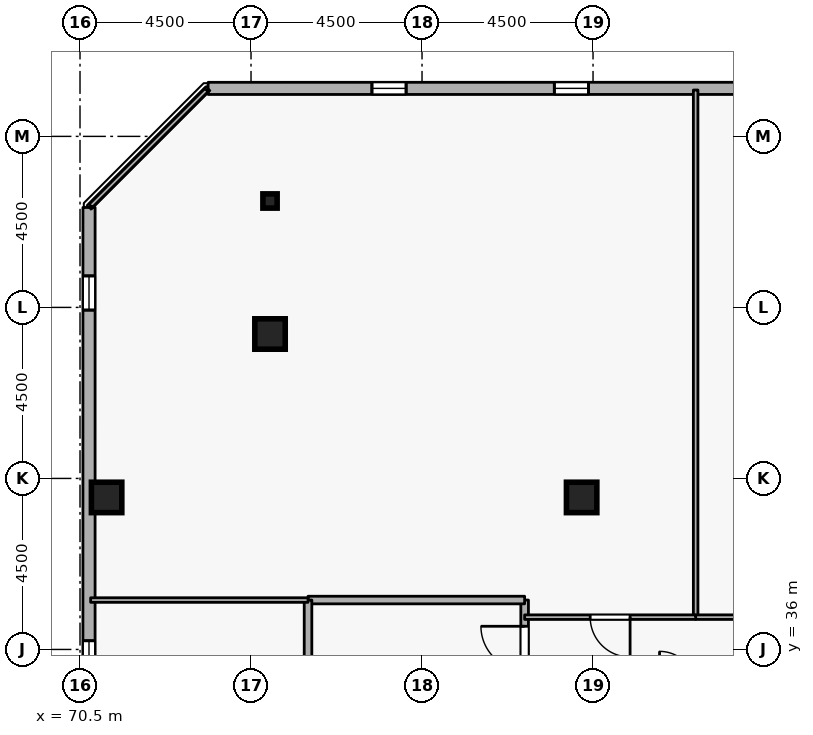
"""IFC4 building model, lengths in metres.
Left out: names, types, materials, properties, quantities, classifications, styles, units other than length and angle.
Written with IfcOpenShell. Run it as: python <this file> out.ifc"""

import sys

from ifc_helpers import new_model, si_unit, direction, frame, frame_2d, origin, origin_2d, place, context, subcontext, project, spatial, rectangle, i_section, extrude, element, fill, save


model = new_model("IFC4")
c1 = context("Model", 3, precision=1e-05, world=origin(), true_north=direction((0.0, 1.0)))
c2 = subcontext(c1, "Body", "Model", "MODEL_VIEW")
j1 = project(units=[si_unit("LENGTHUNIT", "METRE"), si_unit("PLANEANGLEUNIT", "RADIAN")], contexts=[c1])
p1 = place(None, origin())
s1 = spatial("IfcSite", under=j1, at=p1, CompositionType="ELEMENT")
p2 = place(p1, origin())
s2 = spatial("IfcBuilding", under=s1, at=p2, CompositionType="ELEMENT")
p3 = place(p2, frame((0.0, 0.0, 269.1)))
s3 = spatial("IfcBuildingStorey", under=s2, at=p3, CompositionType="ELEMENT", Elevation=269.1)
for number, where, z_axis, x_axis in (
    (1, (75.5, 44.3, 0.0), (0.0, 0.0, 1.0), (1.0, 0.0, 0.0)),
    (2, (71.2, 40.0, 0.0), (0.0, 0.0, 1.0), (1.0, 0.0, 0.0)),
    (3, (83.7, 40.0, 0.0), (0.0, 0.0, 1.0), (1.0, 0.0, 0.0)),
):
    element("IfcColumn", number, at=place(p3, frame(where, z_axis=z_axis, x_axis=x_axis)), inside=s3, PredefinedType="COLUMN", context=c2, shape_type="SweptSolid", body=[
        extrude(rectangle(XDim=0.8, YDim=0.8, at=origin_2d()), origin(), (0.0, 0.0, 1.0), 3.6),
    ])
p4 = place(p3, frame((75.5, 47.8, 0.0), z_axis=(0.0, 0.0, 1.0), x_axis=(1.0, 0.0, 0.0)))
e4 = element("IfcColumn", 4, at=p4, inside=s3, PredefinedType="COLUMN", context=c2, shape_type="SweptSolid", body=[
    extrude(i_section(OverallWidth=0.375, OverallDepth=0.375, WebThickness=0.017, FlangeThickness=0.027, FilletRadius=0.015, at=origin_2d()), origin(), (0.0, 0.0, 1.0), 3.6),
])
p5 = place(p3, frame((109.681, 50.765, 0.0), z_axis=(0.0, 0.0, 1.0), x_axis=(-0.999999998513, -5.4540124e-05, 0.0)))
e5 = element("IfcWall", 5, at=p5, inside=s3, PredefinedType="STANDARD", context=c2, shape_type="SweptSolid", body=[
    extrude(rectangle(XDim=35.811, YDim=0.32, at=frame_2d((17.905, 0.0))), origin(), (0.0, 0.0, 1.0), 2.7),
])
p6 = place(p5, frame((1.8, 0.0, 0.72)))
e6 = element("IfcOpeningElement", 6, at=p6, cuts=e5, PredefinedType="OPENING", context=c2, shape_type="SweptSolid", body=[
    extrude(rectangle(XDim=0.9, YDim=1.75, at=frame_2d((0.45, 0.875))), frame((0.0, 0.17, 0.0), z_axis=(0.0, -1.0, 0.0), x_axis=(1.0, 0.0, 0.0)), (0.0, 0.0, 1.0), 0.34),
])
p7 = place(p5, frame((6.6, 0.0, 0.72)))
e7 = element("IfcOpeningElement", 7, at=p7, cuts=e5, PredefinedType="OPENING", context=c2, shape_type="SweptSolid", body=[
    extrude(rectangle(XDim=0.9, YDim=1.75, at=frame_2d((0.45, 0.875))), frame((0.0, 0.17, 0.0), z_axis=(0.0, -1.0, 0.0), x_axis=(1.0, 0.0, 0.0)), (0.0, 0.0, 1.0), 0.34),
])
p8 = place(p5, frame((11.4, 0.0, 0.72)))
e8 = element("IfcOpeningElement", 8, at=p8, cuts=e5, PredefinedType="OPENING", context=c2, shape_type="SweptSolid", body=[
    extrude(rectangle(XDim=0.9, YDim=1.75, at=frame_2d((0.45, 0.875))), frame((0.0, 0.17, 0.0), z_axis=(0.0, -1.0, 0.0), x_axis=(1.0, 0.0, 0.0)), (0.0, 0.0, 1.0), 0.34),
])
p9 = place(p5, frame((21.0, 0.0, 0.72)))
e9 = element("IfcOpeningElement", 9, at=p9, cuts=e5, PredefinedType="OPENING", context=c2, shape_type="SweptSolid", body=[
    extrude(rectangle(XDim=0.9, YDim=1.75, at=frame_2d((0.45, 0.875))), frame((0.0, 0.17, 0.0), z_axis=(0.0, -1.0, 0.0), x_axis=(1.0, 0.0, 0.0)), (0.0, 0.0, 1.0), 0.34),
])
p10 = place(p5, frame((25.8, 0.0, 0.72)))
e10 = element("IfcOpeningElement", 10, at=p10, cuts=e5, PredefinedType="OPENING", context=c2, shape_type="SweptSolid", body=[
    extrude(rectangle(XDim=0.9, YDim=1.75, at=frame_2d((0.45, 0.875))), frame((0.0, 0.17, 0.0), z_axis=(0.0, -1.0, 0.0), x_axis=(1.0, 0.0, 0.0)), (0.0, 0.0, 1.0), 0.34),
])
p11 = place(p5, frame((30.6, 0.0, 0.72)))
e11 = element("IfcOpeningElement", 11, at=p11, cuts=e5, PredefinedType="OPENING", context=c2, shape_type="SweptSolid", body=[
    extrude(rectangle(XDim=0.9, YDim=1.75, at=frame_2d((0.45, 0.875))), frame((0.0, 0.17, 0.0), z_axis=(0.0, -1.0, 0.0), x_axis=(1.0, 0.0, 0.0)), (0.0, 0.0, 1.0), 0.34),
])
p12 = place(p3, frame((70.737, 47.629, 0.0), z_axis=(0.0, 0.0, 1.0), x_axis=(-5.4540124e-05, -0.999999998513, 0.0)))
e12 = element("IfcWall", 12, at=p12, inside=s3, PredefinedType="STANDARD", context=c2, shape_type="SweptSolid", body=[
    extrude(rectangle(XDim=35.811, YDim=0.32, at=frame_2d((17.905, 0.0))), origin(), (0.0, 0.0, 1.0), 2.7),
])
p13 = place(p12, frame((1.8, 0.0, 0.72)))
e13 = element("IfcOpeningElement", 13, at=p13, cuts=e12, PredefinedType="OPENING", context=c2, shape_type="SweptSolid", body=[
    extrude(rectangle(XDim=0.9, YDim=1.75, at=frame_2d((0.45, 0.875))), frame((0.0, 0.17, 0.0), z_axis=(0.0, -1.0, 0.0), x_axis=(1.0, 0.0, 0.0)), (0.0, 0.0, 1.0), 0.34),
])
p14 = place(p12, frame((11.4, 0.0, 0.72)))
e14 = element("IfcOpeningElement", 14, at=p14, cuts=e12, PredefinedType="OPENING", context=c2, shape_type="SweptSolid", body=[
    extrude(rectangle(XDim=0.9, YDim=1.75, at=frame_2d((0.45, 0.875))), frame((0.0, 0.17, 0.0), z_axis=(0.0, -1.0, 0.0), x_axis=(1.0, 0.0, 0.0)), (0.0, 0.0, 1.0), 0.34),
])
p15 = place(p12, frame((16.2, 0.0, 0.72)))
e15 = element("IfcOpeningElement", 15, at=p15, cuts=e12, PredefinedType="OPENING", context=c2, shape_type="SweptSolid", body=[
    extrude(rectangle(XDim=0.9, YDim=1.75, at=frame_2d((0.45, 0.875))), frame((0.0, 0.17, 0.0), z_axis=(0.0, -1.0, 0.0), x_axis=(1.0, 0.0, 0.0)), (0.0, 0.0, 1.0), 0.34),
])
p16 = place(p12, frame((25.8, 0.0, 0.72)))
e16 = element("IfcOpeningElement", 16, at=p16, cuts=e12, PredefinedType="OPENING", context=c2, shape_type="SweptSolid", body=[
    extrude(rectangle(XDim=0.9, YDim=1.75, at=frame_2d((0.45, 0.875))), frame((0.0, 0.17, 0.0), z_axis=(0.0, -1.0, 0.0), x_axis=(1.0, 0.0, 0.0)), (0.0, 0.0, 1.0), 0.34),
])
p17 = place(p3, frame((82.2, 34.8, 0.0), z_axis=(0.0, 0.0, 1.0), x_axis=(0.0, 1.0, 0.0)))
e17 = element("IfcWall", 17, at=p17, inside=s3, PredefinedType="STANDARD", context=c2, shape_type="SweptSolid", body=[
    extrude(rectangle(XDim=2.5, YDim=0.2, at=frame_2d((1.25, 0.0))), origin(), (0.0, 0.0, 1.0), 3.34),
])
p18 = place(p17, frame((0.66, 0.0, 0.0)))
e18 = element("IfcOpeningElement", 18, at=p18, cuts=e17, PredefinedType="OPENING", context=c2, shape_type="SweptSolid", body=[
    extrude(rectangle(XDim=1.15, YDim=2.1, at=frame_2d((0.575, 1.05))), frame((0.0, 0.11, 0.0), z_axis=(0.0, -1.0, 0.0), x_axis=(1.0, 0.0, 0.0)), (0.0, 0.0, 1.0), 0.22),
])
p19 = place(p3, frame((82.2, 37.3, 0.0), z_axis=(0.0, 0.0, 1.0), x_axis=(-1.0, 0.0, 0.0)))
e19 = element("IfcWall", 19, at=p19, inside=s3, PredefinedType="STANDARD", context=c2, shape_type="SweptSolid", body=[
    extrude(rectangle(XDim=5.7, YDim=0.2, at=frame_2d((2.85, 0.0))), origin(), (0.0, 0.0, 1.0), 3.34),
])
p20 = place(p3, frame((76.5, 37.3, 0.0), z_axis=(0.0, 0.0, 1.0), x_axis=(0.0, -1.0, 0.0)))
e20 = element("IfcWall", 20, at=p20, inside=s3, PredefinedType="STANDARD", context=c2, shape_type="SweptSolid", body=[
    extrude(rectangle(XDim=2.5, YDim=0.2, at=frame_2d((1.25, 0.0))), origin(), (0.0, 0.0, 1.0), 3.34),
])
p21 = place(p3, frame((86.7, 36.85, 0.0), z_axis=(0.0, 0.0, 1.0), x_axis=(0.0, 1.0, 0.0)))
e21 = element("IfcWall", 21, at=p21, inside=s3, PredefinedType="PARTITIONING", context=c2, shape_type="SweptSolid", body=[
    extrude(rectangle(XDim=13.87, YDim=0.12, at=frame_2d((6.935, 0.0))), origin(), (0.0, 0.0, 1.0), 3.34),
])
p22 = place(p3, frame((93.0, 36.85, 0.0), z_axis=(0.0, 0.0, 1.0), x_axis=(-1.0, 0.0, 0.0)))
e22 = element("IfcWall", 22, at=p22, inside=s3, PredefinedType="PARTITIONING", context=c2, shape_type="SweptSolid", body=[
    extrude(rectangle(XDim=6.3, YDim=0.12, at=frame_2d((3.15, 0.0))), origin(), (0.0, 0.0, 1.0), 3.34),
])
p23 = place(p22, frame((2.625, 0.0, 0.0)))
e23 = element("IfcOpeningElement", 23, at=p23, cuts=e22, PredefinedType="OPENING", context=c2, shape_type="SweptSolid", body=[
    extrude(rectangle(XDim=1.05, YDim=2.1, at=frame_2d((0.525, 1.05))), frame((0.0, 0.07, 0.0), z_axis=(0.0, -1.0, 0.0), x_axis=(1.0, 0.0, 0.0)), (0.0, 0.0, 1.0), 0.14),
])
p24 = place(p3, frame((76.5, 37.3, 0.0), z_axis=(0.0, 0.0, 1.0), x_axis=(-1.0, 0.0, 0.0)))
e24 = element("IfcWall", 24, at=p24, inside=s3, PredefinedType="PARTITIONING", context=c2, shape_type="SweptSolid", body=[
    extrude(rectangle(XDim=5.72, YDim=0.12, at=frame_2d((2.86, 0.0))), origin(), (0.0, 0.0, 1.0), 3.34),
])
p25 = place(p3, frame((70.78, 47.671, 0.0), z_axis=(0.0, 0.0, 1.0), x_axis=(0.707106781187, 0.707106781187, 0.0)))
e25 = element("IfcWall", 25, at=p25, inside=s3, PredefinedType="PARTITIONING", context=c2, shape_type="SweptSolid", body=[
    extrude(rectangle(XDim=4.311, YDim=0.12, at=frame_2d((2.156, 0.0))), origin(), (0.0, 0.0, 1.0), 3.34),
])
p26 = place(p3, frame((86.7, 36.85, 0.0), z_axis=(0.0, 0.0, 1.0), x_axis=(-1.0, 0.0, 0.0)))
e26 = element("IfcWall", 26, at=p26, inside=s3, PredefinedType="PARTITIONING", context=c2, shape_type="SweptSolid", body=[
    extrude(rectangle(XDim=4.5, YDim=0.12, at=frame_2d((2.25, 0.0))), origin(), (0.0, 0.0, 1.0), 3.34),
])
p27 = place(p26, frame((1.725, 0.0, 0.0)))
e27 = element("IfcOpeningElement", 27, at=p27, cuts=e26, PredefinedType="OPENING", context=c2, shape_type="SweptSolid", body=[
    extrude(rectangle(XDim=1.05, YDim=2.1, at=frame_2d((0.525, 1.05))), frame((0.0, 0.07, 0.0), z_axis=(0.0, -1.0, 0.0), x_axis=(1.0, 0.0, 0.0)), (0.0, 0.0, 1.0), 0.14),
])
p28 = place(p10, origin())
e28 = element("IfcWindow", 28, at=p28, inside=s3, PartitioningType="SINGLE_PANEL", PredefinedType="WINDOW", context=c2, shape_type="SweptSolid", body=[
    extrude(rectangle(XDim=0.9, YDim=1.75, at=frame_2d((0.45, 0.875))), frame((0.0, 0.03, 0.0), z_axis=(0.0, -1.0, 0.0), x_axis=(1.0, 0.0, 0.0)), (0.0, 0.0, 1.0), 0.06),
])
fill(e10, e28)
p29 = place(p11, origin())
e29 = element("IfcWindow", 29, at=p29, inside=s3, PartitioningType="SINGLE_PANEL", PredefinedType="WINDOW", context=c2, shape_type="SweptSolid", body=[
    extrude(rectangle(XDim=0.9, YDim=1.75, at=frame_2d((0.45, 0.875))), frame((0.0, 0.03, 0.0), z_axis=(0.0, -1.0, 0.0), x_axis=(1.0, 0.0, 0.0)), (0.0, 0.0, 1.0), 0.06),
])
fill(e11, e29)
p30 = place(p13, origin())
e30 = element("IfcWindow", 30, at=p30, inside=s3, PartitioningType="SINGLE_PANEL", PredefinedType="WINDOW", context=c2, shape_type="SweptSolid", body=[
    extrude(rectangle(XDim=0.9, YDim=1.75, at=frame_2d((0.45, 0.875))), frame((0.0, 0.03, 0.0), z_axis=(0.0, -1.0, 0.0), x_axis=(1.0, 0.0, 0.0)), (0.0, 0.0, 1.0), 0.06),
])
fill(e13, e30)
p31 = place(p14, origin())
e31 = element("IfcWindow", 31, at=p31, inside=s3, PartitioningType="SINGLE_PANEL", PredefinedType="WINDOW", context=c2, shape_type="SweptSolid", body=[
    extrude(rectangle(XDim=0.9, YDim=1.75, at=frame_2d((0.45, 0.875))), frame((0.0, 0.03, 0.0), z_axis=(0.0, -1.0, 0.0), x_axis=(1.0, 0.0, 0.0)), (0.0, 0.0, 1.0), 0.06),
])
fill(e14, e31)
p32 = place(p18, origin())
e32 = element("IfcDoor", 32, at=p32, inside=s3, OperationType="SINGLE_SWING_RIGHT", PredefinedType="DOOR", context=c2, shape_type="SweptSolid", body=[
    extrude(rectangle(XDim=1.15, YDim=2.1, at=frame_2d((0.575, 1.05))), frame((0.0, 0.025, 0.0), z_axis=(0.0, -1.0, 0.0), x_axis=(1.0, 0.0, 0.0)), (0.0, 0.0, 1.0), 0.05),
])
fill(e18, e32)
p33 = place(p27, origin())
e33 = element("IfcDoor", 33, at=p33, inside=s3, OperationType="SINGLE_SWING_LEFT", PredefinedType="DOOR", context=c2, shape_type="SweptSolid", body=[
    extrude(rectangle(XDim=1.05, YDim=2.1, at=frame_2d((0.525, 1.05))), frame((0.0, 0.025, 0.0), z_axis=(0.0, -1.0, 0.0), x_axis=(1.0, 0.0, 0.0)), (0.0, 0.0, 1.0), 0.05),
])
fill(e27, e33)
save(model, sys.argv[1])
